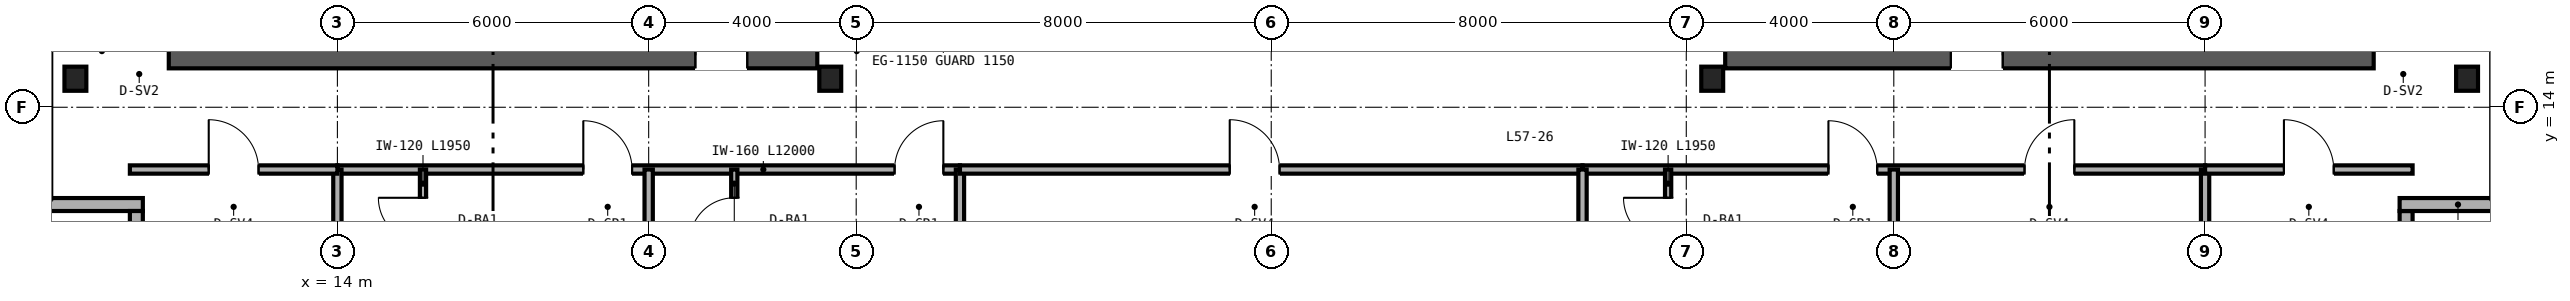
"""IFC4 building model, lengths in metres.
Left out: names, types, materials, properties, quantities, classifications, styles, units other than length and angle.
Written with IfcOpenShell. Run it as: python <this file> out.ifc"""

import sys

from ifc_helpers import new_model, si_unit, direction, frame, frame_2d, origin, origin_2d, place, context, subcontext, project, spatial, rectangle, i_section, extrude, source, transform, mapped, element, fill, save


model = new_model("IFC4")
c1 = context("Model", 3, precision=1e-05, world=origin(), true_north=direction((0.0, 1.0)))
c2 = subcontext(c1, "Body", "Model", "MODEL_VIEW")
j1 = project(units=[si_unit("LENGTHUNIT", "METRE"), si_unit("PLANEANGLEUNIT", "RADIAN")], contexts=[c1])
p1 = place(None, origin())
s1 = spatial("IfcSite", under=j1, at=p1, CompositionType="ELEMENT")
p2 = place(p1, origin())
s2 = spatial("IfcBuilding", under=s1, at=p2, CompositionType="ELEMENT")
p3 = place(p2, frame((0.0, 0.0, 228.0)))
s3 = spatial("IfcBuildingStorey", under=s2, at=p3, CompositionType="ELEMENT", Elevation=228.0)
p4 = place(p3, frame((10.75, 15.0, 0.0), z_axis=(0.0, 0.0, 1.0), x_axis=(1.0, 0.0, 0.0)))
e1 = element("IfcWall", 1, at=p4, inside=s3, PredefinedType="SHEAR", context=c2, shape_type="SweptSolid", body=[
    extrude(rectangle(XDim=12.5, YDim=0.5, at=frame_2d((6.25, 0.0))), origin(), (0.0, 0.0, 1.0), 4.58),
])
p5 = place(p4, frame((10.15, 0.0, 0.0)))
e2 = element("IfcOpeningElement", 2, at=p5, cuts=e1, PredefinedType="OPENING", context=c2, shape_type="SweptSolid", body=[
    extrude(rectangle(XDim=1.0, YDim=2.15, at=frame_2d((0.5, 1.075))), frame((0.0, 0.26, 0.0), z_axis=(0.0, -1.0, 0.0), x_axis=(1.0, 0.0, 0.0)), (0.0, 0.0, 1.0), 0.52),
])
p6 = place(p3, frame((40.75, 15.0, 0.0), z_axis=(0.0, 0.0, 1.0), x_axis=(1.0, 0.0, 0.0)))
e3 = element("IfcWall", 3, at=p6, inside=s3, PredefinedType="SHEAR", context=c2, shape_type="SweptSolid", body=[
    extrude(rectangle(XDim=12.5, YDim=0.5, at=frame_2d((6.25, 0.0))), origin(), (0.0, 0.0, 1.0), 4.58),
])
p7 = place(p6, frame((4.35, 0.0, 0.0)))
e4 = element("IfcOpeningElement", 4, at=p7, cuts=e3, PredefinedType="OPENING", context=c2, shape_type="SweptSolid", body=[
    extrude(rectangle(XDim=1.0, YDim=2.15, at=frame_2d((0.5, 1.075))), frame((0.0, 0.26, 0.0), z_axis=(0.0, -1.0, 0.0), x_axis=(1.0, 0.0, 0.0)), (0.0, 0.0, 1.0), 0.52),
])
m1 = source(origin(), c2, "Body", "SweptSolid", [
    extrude(i_section(OverallWidth=0.422, OverallDepth=0.465, WebThickness=0.045, FlangeThickness=0.073, FilletRadius=0.025, at=origin_2d()), origin(), (0.0, 0.0, 1.0), 4.58),
])
for number, where, z_axis, x_axis in (
    (5, (8.95, 14.55, 0.0), (0.0, 0.0, 1.0), (1.0, 0.0, 0.0)),
    (6, (23.5, 14.55, 0.0), (0.0, 0.0, 1.0), (1.0, 0.0, 0.0)),
    (7, (40.5, 14.55, 0.0), (0.0, 0.0, 1.0), (1.0, 0.0, 0.0)),
    (8, (55.05, 14.55, 0.0), (0.0, 0.0, 1.0), (1.0, 0.0, 0.0)),
):
    element("IfcColumn", number, at=place(p3, frame(where, z_axis=z_axis, x_axis=x_axis)), inside=s3, PredefinedType="COLUMN", context=c2, shape_type="MappedRepresentation", body=[
        mapped(m1, transform((0.0, 0.0, 0.0), scale=1.0)),
    ])
p8 = place(p3, frame((53.875, 10.0, 0.0), z_axis=(0.0, 0.0, 1.0), x_axis=(0.0, 1.0, 0.0)))
e9 = element("IfcWall", 9, at=p8, inside=s3, PredefinedType="SOLIDWALL", context=c2, shape_type="SweptSolid", body=[
    extrude(rectangle(XDim=2.0, YDim=0.25, at=frame_2d((1.0, 0.0))), origin(), (0.0, 0.0, 1.0), 4.58),
])
for number, where, z_axis, x_axis in (
    (10, (53.75, 12.125, 0.0), (0.0, 0.0, 1.0), (1.0, 0.0, 0.0)),
    (11, (8.0, 12.125, 0.0), (0.0, 0.0, 1.0), (1.0, 0.0, 0.0)),
):
    element("IfcWall", number, at=place(p3, frame(where, z_axis=z_axis, x_axis=x_axis)), inside=s3, PredefinedType="SOLIDWALL", context=c2, shape_type="SweptSolid", body=[
        extrude(rectangle(XDim=2.25, YDim=0.25, at=frame_2d((1.125, 0.0))), origin(), (0.0, 0.0, 1.0), 4.58),
    ])
p9 = place(p3, frame((10.125, 12.0, 0.0), z_axis=(0.0, 0.0, 1.0), x_axis=(0.0, -1.0, 0.0)))
e12 = element("IfcWall", 12, at=p9, inside=s3, PredefinedType="SOLIDWALL", context=c2, shape_type="SweptSolid", body=[
    extrude(rectangle(XDim=2.0, YDim=0.25, at=frame_2d((1.0, 0.0))), origin(), (0.0, 0.0, 1.0), 4.58),
])
p10 = place(p3, frame((14.0, 12.8, 0.0), z_axis=(0.0, 0.0, 1.0), x_axis=(1.0, 0.0, 0.0)))
e13 = element("IfcWall", 13, at=p10, inside=s3, PredefinedType="PARTITIONING", context=c2, shape_type="SweptSolid", body=[
    extrude(rectangle(XDim=12.0, YDim=0.16, at=frame_2d((6.0, 0.0))), origin(), (0.0, 0.0, 1.0), 4.123),
])
p11 = place(p10, frame((4.74, 0.0, 0.0)))
e14 = element("IfcOpeningElement", 14, at=p11, cuts=e13, PredefinedType="OPENING", context=c2, shape_type="SweptSolid", body=[
    extrude(rectangle(XDim=0.94, YDim=2.15, at=frame_2d((0.47, 1.075))), frame((0.0, 0.09, 0.0), z_axis=(0.0, -1.0, 0.0), x_axis=(1.0, 0.0, 0.0)), (0.0, 0.0, 1.0), 0.18),
])
p12 = place(p10, frame((10.74, 0.0, 0.0)))
e15 = element("IfcOpeningElement", 15, at=p12, cuts=e13, PredefinedType="OPENING", context=c2, shape_type="SweptSolid", body=[
    extrude(rectangle(XDim=0.94, YDim=2.15, at=frame_2d((0.47, 1.075))), frame((0.0, 0.09, 0.0), z_axis=(0.0, -1.0, 0.0), x_axis=(1.0, 0.0, 0.0)), (0.0, 0.0, 1.0), 0.18),
])
p13 = place(p3, frame((14.0, 6.36, 0.0), z_axis=(0.0, 0.0, 1.0), x_axis=(0.0, 1.0, 0.0)))
e16 = element("IfcWall", 16, at=p13, inside=s3, PredefinedType="PARTITIONING", context=c2, shape_type="SweptSolid", body=[
    extrude(rectangle(XDim=6.44, YDim=0.16, at=frame_2d((3.22, 0.0))), origin(), (0.0, 0.0, 1.0), 3.887),
])
p14 = place(p3, frame((26.0, 6.36, 0.0), z_axis=(0.0, 0.0, 1.0), x_axis=(0.0, 1.0, 0.0)))
e17 = element("IfcWall", 17, at=p14, inside=s3, PredefinedType="PARTITIONING", context=c2, shape_type="SweptSolid", body=[
    extrude(rectangle(XDim=6.44, YDim=0.16, at=frame_2d((3.22, 0.0))), origin(), (0.0, 0.0, 1.0), 3.653),
])
p15 = place(p3, frame((20.0, 6.36, 0.0), z_axis=(0.0, 0.0, 1.0), x_axis=(0.0, 1.0, 0.0)))
e18 = element("IfcWall", 18, at=p15, inside=s3, PredefinedType="PARTITIONING", context=c2, shape_type="SweptSolid", body=[
    extrude(rectangle(XDim=6.44, YDim=0.16, at=frame_2d((3.22, 0.0))), origin(), (0.0, 0.0, 1.0), 3.887),
])
p16 = place(p3, frame((15.65, 10.85, 0.0), z_axis=(0.0, 0.0, 1.0), x_axis=(0.0, 1.0, 0.0)))
e19 = element("IfcWall", 19, at=p16, inside=s3, PredefinedType="PARTITIONING", context=c2, shape_type="SweptSolid", body=[
    extrude(rectangle(XDim=1.95, YDim=0.12, at=frame_2d((0.975, 0.0))), origin(), (0.0, 0.0, 1.0), 4.58),
])
p17 = place(p16, frame((0.545, 0.0, 0.0)))
e20 = element("IfcOpeningElement", 20, at=p17, cuts=e19, PredefinedType="OPENING", context=c2, shape_type="SweptSolid", body=[
    extrude(rectangle(XDim=0.86, YDim=2.1, at=frame_2d((0.43, 1.05))), frame((0.0, 0.07, 0.0), z_axis=(0.0, -1.0, 0.0), x_axis=(1.0, 0.0, 0.0)), (0.0, 0.0, 1.0), 0.14),
])
p18 = place(p3, frame((21.65, 10.85, 0.0), z_axis=(0.0, 0.0, 1.0), x_axis=(0.0, 1.0, 0.0)))
e21 = element("IfcWall", 21, at=p18, inside=s3, PredefinedType="PARTITIONING", context=c2, shape_type="SweptSolid", body=[
    extrude(rectangle(XDim=1.95, YDim=0.12, at=frame_2d((0.975, 0.0))), origin(), (0.0, 0.0, 1.0), 4.58),
])
p19 = place(p18, frame((0.545, 0.0, 0.0)))
e22 = element("IfcOpeningElement", 22, at=p19, cuts=e21, PredefinedType="OPENING", context=c2, shape_type="SweptSolid", body=[
    extrude(rectangle(XDim=0.86, YDim=2.1, at=frame_2d((0.43, 1.05))), frame((0.0, 0.07, 0.0), z_axis=(0.0, -1.0, 0.0), x_axis=(1.0, 0.0, 0.0)), (0.0, 0.0, 1.0), 0.14),
])
p20 = place(p3, frame((26.0, 12.8, 0.0), z_axis=(0.0, 0.0, 1.0), x_axis=(1.0, 0.0, 0.0)))
e23 = element("IfcWall", 23, at=p20, inside=s3, PredefinedType="PARTITIONING", context=c2, shape_type="SweptSolid", body=[
    extrude(rectangle(XDim=12.0, YDim=0.16, at=frame_2d((6.0, 0.0))), origin(), (0.0, 0.0, 1.0), 4.58),
])
p21 = place(p20, frame((5.2, 0.0, 0.0)))
e24 = element("IfcOpeningElement", 24, at=p21, cuts=e23, PredefinedType="OPENING", context=c2, shape_type="SweptSolid", body=[
    extrude(rectangle(XDim=0.96, YDim=2.15, at=frame_2d((0.48, 1.075))), frame((0.0, 0.09, 0.0), z_axis=(0.0, -1.0, 0.0), x_axis=(1.0, 0.0, 0.0)), (0.0, 0.0, 1.0), 0.18),
])
p22 = place(p3, frame((38.0, 12.8, 0.0), z_axis=(0.0, 0.0, 1.0), x_axis=(1.0, 0.0, 0.0)))
e25 = element("IfcWall", 25, at=p22, inside=s3, PredefinedType="PARTITIONING", context=c2, shape_type="SweptSolid", body=[
    extrude(rectangle(XDim=12.0, YDim=0.16, at=frame_2d((6.0, 0.0))), origin(), (0.0, 0.0, 1.0), 4.123),
])
p23 = place(p22, frame((4.74, 0.0, 0.0)))
e26 = element("IfcOpeningElement", 26, at=p23, cuts=e25, PredefinedType="OPENING", context=c2, shape_type="SweptSolid", body=[
    extrude(rectangle(XDim=0.94, YDim=2.15, at=frame_2d((0.47, 1.075))), frame((0.0, 0.09, 0.0), z_axis=(0.0, -1.0, 0.0), x_axis=(1.0, 0.0, 0.0)), (0.0, 0.0, 1.0), 0.18),
])
p24 = place(p22, frame((8.52, 0.0, 0.0)))
e27 = element("IfcOpeningElement", 27, at=p24, cuts=e25, PredefinedType="OPENING", context=c2, shape_type="SweptSolid", body=[
    extrude(rectangle(XDim=0.96, YDim=2.15, at=frame_2d((0.48, 1.075))), frame((0.0, 0.09, 0.0), z_axis=(0.0, -1.0, 0.0), x_axis=(1.0, 0.0, 0.0)), (0.0, 0.0, 1.0), 0.18),
])
p25 = place(p3, frame((38.0, 6.36, 0.0), z_axis=(0.0, 0.0, 1.0), x_axis=(0.0, 1.0, 0.0)))
e28 = element("IfcWall", 28, at=p25, inside=s3, PredefinedType="PARTITIONING", context=c2, shape_type="SweptSolid", body=[
    extrude(rectangle(XDim=6.44, YDim=0.16, at=frame_2d((3.22, 0.0))), origin(), (0.0, 0.0, 1.0), 3.653),
])
for number, where, z_axis, x_axis in (
    (29, (50.0, 6.36, 0.0), (0.0, 0.0, 1.0), (0.0, 1.0, 0.0)),
    (30, (44.0, 6.36, 0.0), (0.0, 0.0, 1.0), (0.0, 1.0, 0.0)),
):
    element("IfcWall", number, at=place(p3, frame(where, z_axis=z_axis, x_axis=x_axis)), inside=s3, PredefinedType="PARTITIONING", context=c2, shape_type="SweptSolid", body=[
        extrude(rectangle(XDim=6.44, YDim=0.16, at=frame_2d((3.22, 0.0))), origin(), (0.0, 0.0, 1.0), 3.887),
    ])
p26 = place(p3, frame((39.65, 10.85, 0.0), z_axis=(0.0, 0.0, 1.0), x_axis=(0.0, 1.0, 0.0)))
e31 = element("IfcWall", 31, at=p26, inside=s3, PredefinedType="PARTITIONING", context=c2, shape_type="SweptSolid", body=[
    extrude(rectangle(XDim=1.95, YDim=0.12, at=frame_2d((0.975, 0.0))), origin(), (0.0, 0.0, 1.0), 4.58),
])
p27 = place(p26, frame((0.545, 0.0, 0.0)))
e32 = element("IfcOpeningElement", 32, at=p27, cuts=e31, PredefinedType="OPENING", context=c2, shape_type="SweptSolid", body=[
    extrude(rectangle(XDim=0.86, YDim=2.1, at=frame_2d((0.43, 1.05))), frame((0.0, 0.07, 0.0), z_axis=(0.0, -1.0, 0.0), x_axis=(1.0, 0.0, 0.0)), (0.0, 0.0, 1.0), 0.14),
])
p28 = place(p3, frame((10.0, 12.8, 0.0), z_axis=(0.0, 0.0, 1.0), x_axis=(1.0, 0.0, 0.0)))
e33 = element("IfcWall", 33, at=p28, inside=s3, PredefinedType="PARTITIONING", context=c2, shape_type="SweptSolid", body=[
    extrude(rectangle(XDim=4.0, YDim=0.16, at=frame_2d((2.0, 0.0))), origin(), (0.0, 0.0, 1.0), 4.58),
])
p29 = place(p28, frame((1.52, 0.0, 0.0)))
e34 = element("IfcOpeningElement", 34, at=p29, cuts=e33, PredefinedType="OPENING", context=c2, shape_type="SweptSolid", body=[
    extrude(rectangle(XDim=0.96, YDim=2.15, at=frame_2d((0.48, 1.075))), frame((0.0, 0.09, 0.0), z_axis=(0.0, -1.0, 0.0), x_axis=(1.0, 0.0, 0.0)), (0.0, 0.0, 1.0), 0.18),
])
p30 = place(p3, frame((50.0, 12.8, 0.0), z_axis=(0.0, 0.0, 1.0), x_axis=(1.0, 0.0, 0.0)))
e35 = element("IfcWall", 35, at=p30, inside=s3, PredefinedType="PARTITIONING", context=c2, shape_type="SweptSolid", body=[
    extrude(rectangle(XDim=4.0, YDim=0.16, at=frame_2d((2.0, 0.0))), origin(), (0.0, 0.0, 1.0), 4.58),
])
p31 = place(p30, frame((1.52, 0.0, 0.0)))
e36 = element("IfcOpeningElement", 36, at=p31, cuts=e35, PredefinedType="OPENING", context=c2, shape_type="SweptSolid", body=[
    extrude(rectangle(XDim=0.96, YDim=2.15, at=frame_2d((0.48, 1.075))), frame((0.0, 0.09, 0.0), z_axis=(0.0, -1.0, 0.0), x_axis=(1.0, 0.0, 0.0)), (0.0, 0.0, 1.0), 0.18),
])
m2 = source(origin(), c2, "Body", "SweptSolid", [
    extrude(rectangle(XDim=1.0, YDim=2.15, at=frame_2d((0.5, 1.075))), frame((0.0, 0.025, 0.0), z_axis=(0.0, -1.0, 0.0), x_axis=(1.0, 0.0, 0.0)), (0.0, 0.0, 1.0), 0.05),
])
p32 = place(p5, origin())
e37 = element("IfcDoor", 37, at=p32, inside=s3, OperationType="SINGLE_SWING_LEFT", PredefinedType="DOOR", context=c2, shape_type="MappedRepresentation", body=[
    mapped(m2, transform((0.0, 0.0, 0.0), scale=1.0)),
])
fill(e2, e37)
p33 = place(p7, origin())
e38 = element("IfcDoor", 38, at=p33, inside=s3, OperationType="SINGLE_SWING_RIGHT", PredefinedType="DOOR", context=c2, shape_type="MappedRepresentation", body=[
    mapped(m2, transform((0.0, 0.0, 0.0), scale=1.0)),
])
fill(e4, e38)
m3 = source(origin(), c2, "Body", "SweptSolid", [
    extrude(rectangle(XDim=0.86, YDim=2.1, at=frame_2d((0.43, 1.05))), frame((0.0, 0.025, 0.0), z_axis=(0.0, -1.0, 0.0), x_axis=(1.0, 0.0, 0.0)), (0.0, 0.0, 1.0), 0.05),
])
p34 = place(p17, origin())
e39 = element("IfcDoor", 39, at=p34, inside=s3, OperationType="SINGLE_SWING_RIGHT", PredefinedType="DOOR", context=c2, shape_type="MappedRepresentation", body=[
    mapped(m3, transform((0.0, 0.0, 0.0), scale=1.0)),
])
fill(e20, e39)
p35 = place(p19, origin())
e40 = element("IfcDoor", 40, at=p35, inside=s3, OperationType="SINGLE_SWING_LEFT", PredefinedType="DOOR", context=c2, shape_type="MappedRepresentation", body=[
    mapped(m3, transform((0.0, 0.0, 0.0), scale=1.0)),
])
fill(e22, e40)
m4 = source(origin(), c2, "Body", "SweptSolid", [
    extrude(rectangle(XDim=0.94, YDim=2.15, at=frame_2d((0.47, 1.075))), frame((0.0, 0.025, 0.0), z_axis=(0.0, -1.0, 0.0), x_axis=(1.0, 0.0, 0.0)), (0.0, 0.0, 1.0), 0.05),
])
p36 = place(p11, origin())
e41 = element("IfcDoor", 41, at=p36, inside=s3, OperationType="SINGLE_SWING_LEFT", PredefinedType="DOOR", context=c2, shape_type="MappedRepresentation", body=[
    mapped(m4, transform((0.0, 0.0, 0.0), scale=1.0)),
])
fill(e14, e41)
p37 = place(p12, origin())
e42 = element("IfcDoor", 42, at=p37, inside=s3, OperationType="SINGLE_SWING_RIGHT", PredefinedType="DOOR", context=c2, shape_type="MappedRepresentation", body=[
    mapped(m4, transform((0.0, 0.0, 0.0), scale=1.0)),
])
fill(e15, e42)
m5 = source(origin(), c2, "Body", "SweptSolid", [
    extrude(rectangle(XDim=0.96, YDim=2.15, at=frame_2d((0.48, 1.075))), frame((0.0, 0.025, 0.0), z_axis=(0.0, -1.0, 0.0), x_axis=(1.0, 0.0, 0.0)), (0.0, 0.0, 1.0), 0.05),
])
p38 = place(p21, origin())
e43 = element("IfcDoor", 43, at=p38, inside=s3, OperationType="SINGLE_SWING_LEFT", PredefinedType="DOOR", context=c2, shape_type="MappedRepresentation", body=[
    mapped(m5, transform((0.0, 0.0, 0.0), scale=1.0)),
])
fill(e24, e43)
p39 = place(p27, origin())
e44 = element("IfcDoor", 44, at=p39, inside=s3, OperationType="SINGLE_SWING_RIGHT", PredefinedType="DOOR", context=c2, shape_type="MappedRepresentation", body=[
    mapped(m3, transform((0.0, 0.0, 0.0), scale=1.0)),
])
fill(e32, e44)
p40 = place(p23, origin())
e45 = element("IfcDoor", 45, at=p40, inside=s3, OperationType="SINGLE_SWING_LEFT", PredefinedType="DOOR", context=c2, shape_type="MappedRepresentation", body=[
    mapped(m4, transform((0.0, 0.0, 0.0), scale=1.0)),
])
fill(e26, e45)
p41 = place(p24, origin())
e46 = element("IfcDoor", 46, at=p41, inside=s3, OperationType="SINGLE_SWING_RIGHT", PredefinedType="DOOR", context=c2, shape_type="MappedRepresentation", body=[
    mapped(m5, transform((0.0, 0.0, 0.0), scale=1.0)),
])
fill(e27, e46)
p42 = place(p29, origin())
e47 = element("IfcDoor", 47, at=p42, inside=s3, OperationType="SINGLE_SWING_LEFT", PredefinedType="DOOR", context=c2, shape_type="MappedRepresentation", body=[
    mapped(m5, transform((0.0, 0.0, 0.0), scale=1.0)),
])
fill(e34, e47)
p43 = place(p31, origin())
e48 = element("IfcDoor", 48, at=p43, inside=s3, OperationType="SINGLE_SWING_LEFT", PredefinedType="DOOR", context=c2, shape_type="MappedRepresentation", body=[
    mapped(m5, transform((0.0, 0.0, 0.0), scale=1.0)),
])
fill(e36, e48)
save(model, sys.argv[1])
